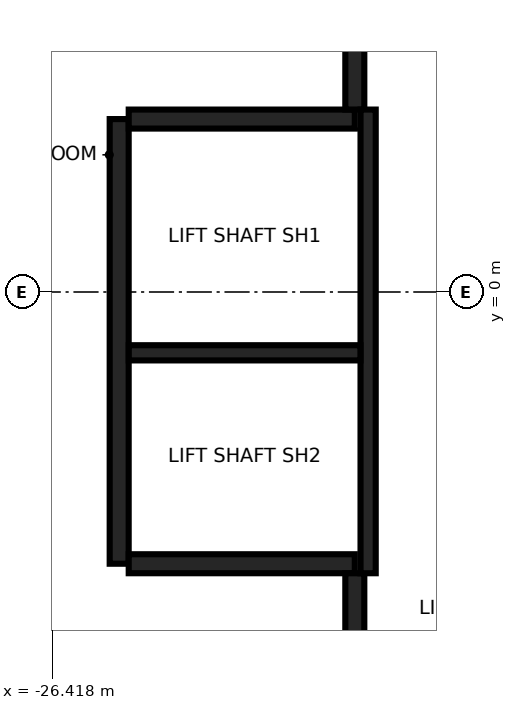
"""IFC4 building model, lengths in metres.
Left out: names, types, materials, properties, quantities, classifications, styles, units other than length and angle.
Written with IfcOpenShell. Run it as: python <this file> out.ifc"""

import sys

from ifc_helpers import new_model, si_unit, direction, frame, frame_2d, origin, place, context, subcontext, project, spatial, rectangle, extrude, element, save


model = new_model("IFC4")
c1 = context("Model", 3, precision=1e-05, world=origin(), true_north=direction((0.0, 1.0)))
c2 = subcontext(c1, "Body", "Model", "MODEL_VIEW")
j1 = project(units=[si_unit("LENGTHUNIT", "METRE"), si_unit("PLANEANGLEUNIT", "RADIAN")], contexts=[c1])
p1 = place(None, origin())
s1 = spatial("IfcSite", under=j1, at=p1, CompositionType="ELEMENT")
p2 = place(p1, origin())
s2 = spatial("IfcBuilding", under=s1, at=p2, CompositionType="ELEMENT")
p3 = place(p2, frame((0.0, 0.0, 161.2)))
s3 = spatial("IfcBuildingStorey", under=s2, at=p3, CompositionType="ELEMENT", Elevation=161.2)
p4 = place(p3, frame((-25.537, -3.575, 0.0), z_axis=(0.0, 0.0, 1.0), x_axis=(0.0, 1.0, 0.0)))
e1 = element("IfcWall", 1, at=p4, inside=s3, PredefinedType="SHEAR", context=c2, shape_type="SweptSolid", body=[
    extrude(rectangle(XDim=5.85, YDim=0.25, at=frame_2d((2.925, 0.0))), origin(), (0.0, 0.0, 1.0), 3.2),
])
for number, where, z_axis, x_axis in (
    (2, (-22.437, -3.575, 0.0), (0.0, 0.0, 1.0), (-1.0, 0.0, 0.0)),
    (3, (-25.412, 2.275, 0.0), (0.0, 0.0, 1.0), (1.0, 0.0, 0.0)),
):
    element("IfcWall", number, at=place(p3, frame(where, z_axis=z_axis, x_axis=x_axis)), inside=s3, PredefinedType="SHEAR", context=c2, shape_type="SweptSolid", body=[
        extrude(rectangle(XDim=2.975, YDim=0.25, at=frame_2d((1.487, 0.0))), origin(), (0.0, 0.0, 1.0), 3.2),
    ])
p5 = place(p3, frame((-22.437, 2.4, 0.0), z_axis=(0.0, 0.0, 1.0), x_axis=(0.0, 1.0, 0.0)))
e4 = element("IfcWall", 4, at=p5, inside=s3, PredefinedType="SHEAR", context=c2, shape_type="SweptSolid", body=[
    extrude(rectangle(XDim=1.975, YDim=0.25, at=frame_2d((0.987, 0.0))), origin(), (0.0, 0.0, 1.0), 3.2),
])
p6 = place(p3, frame((-22.437, -5.55, 0.0), z_axis=(0.0, 0.0, 1.0), x_axis=(0.0, 1.0, 0.0)))
e5 = element("IfcWall", 5, at=p6, inside=s3, PredefinedType="SHEAR", context=c2, shape_type="SweptSolid", body=[
    extrude(rectangle(XDim=1.849, YDim=0.25, at=frame_2d((0.925, 0.0))), origin(), (0.0, 0.0, 1.0), 3.2),
])
p7 = place(p3, frame((-22.262, 2.4, 0.0), z_axis=(0.0, 0.0, 1.0), x_axis=(0.0, -1.0, 0.0)))
e6 = element("IfcWall", 6, at=p7, inside=s3, PredefinedType="SHEAR", context=c2, shape_type="SweptSolid", body=[
    extrude(rectangle(XDim=6.1, YDim=0.2, at=frame_2d((3.05, 0.0))), origin(), (0.0, 0.0, 1.0), 3.2),
])
p8 = place(p3, frame((-22.363, -0.8, 0.0), z_axis=(0.0, 0.0, 1.0), x_axis=(-1.0, 0.0, 0.0)))
e7 = element("IfcWall", 7, at=p8, inside=s3, PredefinedType="SHEAR", context=c2, shape_type="SweptSolid", body=[
    extrude(rectangle(XDim=3.048, YDim=0.2, at=frame_2d((1.524, 0.0))), origin(), (0.0, 0.0, 1.0), 3.2),
])
save(model, sys.argv[1])
